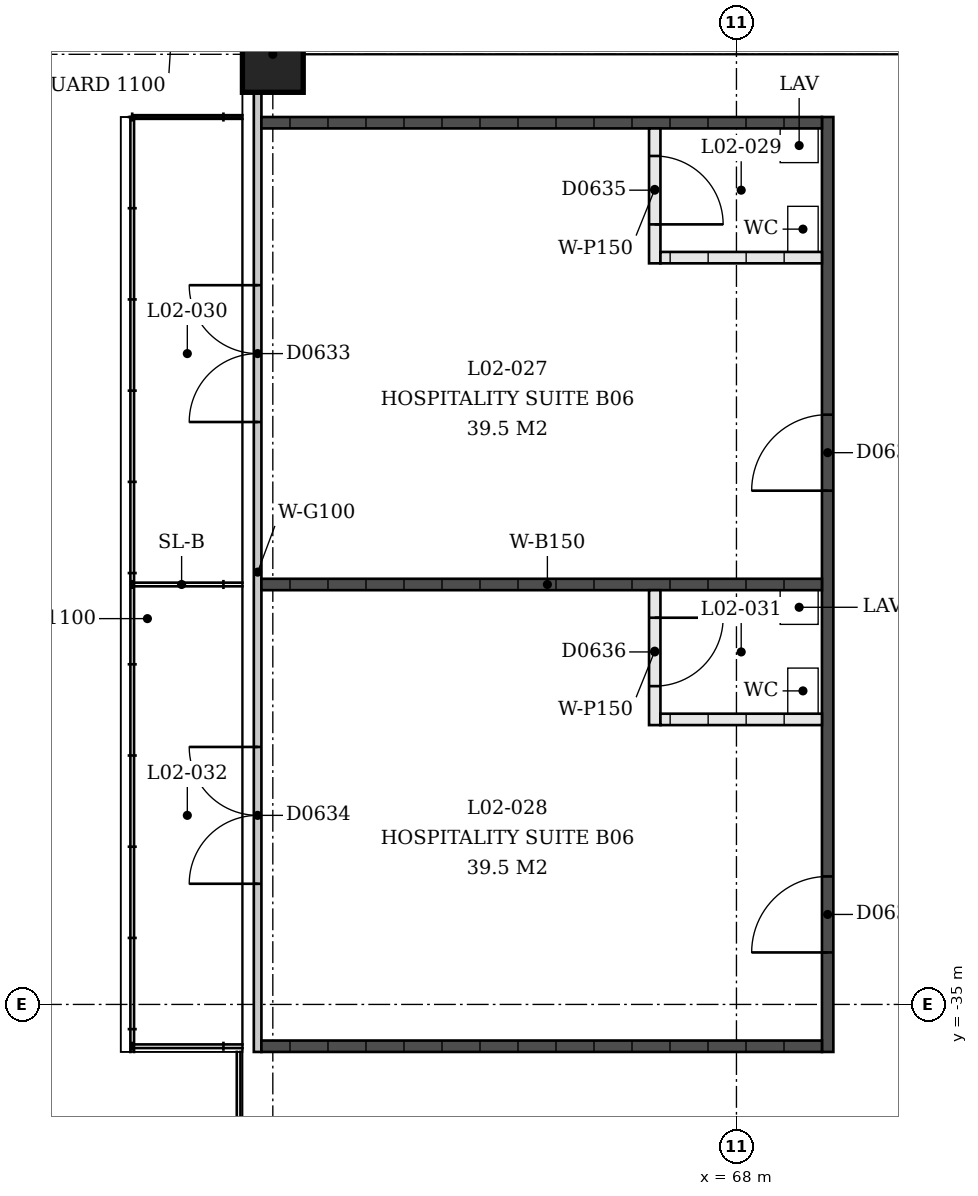
"""IFC4 building model, lengths in metres.
Left out: names, types, materials, properties, quantities, classifications, styles, units other than length and angle.
Written with IfcOpenShell. Run it as: python <this file> out.ifc"""

import sys

from ifc_helpers import new_model, si_unit, direction, frame, frame_2d, origin, origin_2d, place, context, subcontext, project, spatial, rectangle, extrude, element, fill, save


model = new_model("IFC4")
c1 = context("Model", 3, precision=1e-05, world=origin(), true_north=direction((0.0, 1.0)))
c2 = subcontext(c1, "Body", "Model", "MODEL_VIEW")
j1 = project(units=[si_unit("LENGTHUNIT", "METRE"), si_unit("PLANEANGLEUNIT", "RADIAN")], contexts=[c1])
p1 = place(None, origin())
s1 = spatial("IfcSite", under=j1, at=p1, CompositionType="ELEMENT")
p2 = place(p1, origin())
s2 = spatial("IfcBuilding", under=s1, at=p2, CompositionType="ELEMENT")
p3 = place(p2, frame((0.0, 0.0, 9.0)))
s3 = spatial("IfcBuildingStorey", under=s2, at=p3, CompositionType="ELEMENT", Elevation=9.0)
p4 = place(p3, frame((61.9, -22.5, 0.0), z_axis=(0.0, 0.0, 1.0), x_axis=(0.0, 1.0, 0.0)))
e1 = element("IfcColumn", 1, at=p4, inside=s3, PredefinedType="COLUMN", context=c2, shape_type="SweptSolid", body=[
    extrude(rectangle(XDim=1.0, YDim=0.8, at=origin_2d()), origin(), (0.0, 0.0, 1.0), 4.5),
])
p5 = place(p3, frame((61.7, -23.0, 0.0), z_axis=(0.0, 0.0, 1.0), x_axis=(0.0, -1.0, 0.0)))
e2 = element("IfcWall", 2, at=p5, inside=s3, PredefinedType="PARTITIONING", context=c2, shape_type="SweptSolid", body=[
    extrude(rectangle(XDim=12.625, YDim=0.1, at=frame_2d((6.312, 0.0))), origin(), (0.0, 0.0, 1.0), 3.0),
])
p6 = place(p5, frame((2.538, 0.0, 0.0)))
e3 = element("IfcOpeningElement", 3, at=p6, cuts=e2, PredefinedType="OPENING", context=c2, shape_type="SweptSolid", body=[
    extrude(rectangle(XDim=1.8, YDim=2.1, at=frame_2d((0.9, 1.05))), frame((0.0, 0.05, 0.0), z_axis=(0.0, -1.0, 0.0), x_axis=(1.0, 0.0, 0.0)), (0.0, 0.0, 1.0), 0.1),
])
p7 = place(p5, frame((8.613, 0.0, 0.0)))
e4 = element("IfcOpeningElement", 4, at=p7, cuts=e2, PredefinedType="OPENING", context=c2, shape_type="SweptSolid", body=[
    extrude(rectangle(XDim=1.8, YDim=2.1, at=frame_2d((0.9, 1.05))), frame((0.0, 0.05, 0.0), z_axis=(0.0, -1.0, 0.0), x_axis=(1.0, 0.0, 0.0)), (0.0, 0.0, 1.0), 0.1),
])
p8 = place(p3, frame((69.2, -23.325, 0.0), z_axis=(0.0, 0.0, 1.0), x_axis=(0.0, -1.0, 0.0)))
e5 = element("IfcWall", 5, at=p8, inside=s3, PredefinedType="SOLIDWALL", context=c2, shape_type="SweptSolid", body=[
    extrude(rectangle(XDim=12.3, YDim=0.15, at=frame_2d((6.15, 0.0))), origin(), (0.0, 0.0, 1.0), 3.0),
])
p9 = place(p8, frame((3.916, 0.0, 0.0)))
e6 = element("IfcOpeningElement", 6, at=p9, cuts=e5, PredefinedType="OPENING", context=c2, shape_type="SweptSolid", body=[
    extrude(rectangle(XDim=1.0, YDim=2.1, at=frame_2d((0.5, 1.05))), frame((0.0, 0.075, 0.0), z_axis=(0.0, -1.0, 0.0), x_axis=(1.0, 0.0, 0.0)), (0.0, 0.0, 1.0), 0.15),
])
p10 = place(p8, frame((9.991, 0.0, 0.0)))
e7 = element("IfcOpeningElement", 7, at=p10, cuts=e5, PredefinedType="OPENING", context=c2, shape_type="SweptSolid", body=[
    extrude(rectangle(XDim=1.0, YDim=2.1, at=frame_2d((0.5, 1.05))), frame((0.0, 0.075, 0.0), z_axis=(0.0, -1.0, 0.0), x_axis=(1.0, 0.0, 0.0)), (0.0, 0.0, 1.0), 0.15),
])
for number, where, z_axis, x_axis in (
    (8, (61.75, -23.4, 0.0), (0.0, 0.0, 1.0), (1.0, 0.0, 0.0)),
    (9, (61.75, -29.475, 0.0), (0.0, 0.0, 1.0), (1.0, 0.0, 0.0)),
    (10, (61.75, -35.55, 0.0), (0.0, 0.0, 1.0), (1.0, 0.0, 0.0)),
):
    element("IfcWall", number, at=place(p3, frame(where, z_axis=z_axis, x_axis=x_axis)), inside=s3, PredefinedType="SOLIDWALL", context=c2, shape_type="SweptSolid", body=[
        extrude(rectangle(XDim=7.375, YDim=0.15, at=frame_2d((3.688, 0.0))), origin(), (0.0, 0.0, 1.0), 3.0),
    ])
p11 = place(p3, frame((66.925, -23.475, 0.0), z_axis=(0.0, 0.0, 1.0), x_axis=(0.0, -1.0, 0.0)))
e11 = element("IfcWall", 11, at=p11, inside=s3, PredefinedType="PARTITIONING", context=c2, shape_type="SweptSolid", body=[
    extrude(rectangle(XDim=1.775, YDim=0.15, at=frame_2d((0.887, 0.0))), origin(), (0.0, 0.0, 1.0), 3.0),
])
p12 = place(p11, frame((0.363, 0.0, 0.0)))
e12 = element("IfcOpeningElement", 12, at=p12, cuts=e11, PredefinedType="OPENING", context=c2, shape_type="SweptSolid", body=[
    extrude(rectangle(XDim=0.9, YDim=2.1, at=frame_2d((0.45, 1.05))), frame((0.0, 0.075, 0.0), z_axis=(0.0, -1.0, 0.0), x_axis=(1.0, 0.0, 0.0)), (0.0, 0.0, 1.0), 0.15),
])
p13 = place(p3, frame((67.0, -25.175, 0.0), z_axis=(0.0, 0.0, 1.0), x_axis=(1.0, 0.0, 0.0)))
e13 = element("IfcWall", 13, at=p13, inside=s3, PredefinedType="PARTITIONING", context=c2, shape_type="SweptSolid", body=[
    extrude(rectangle(XDim=2.125, YDim=0.15, at=frame_2d((1.062, 0.0))), origin(), (0.0, 0.0, 1.0), 3.0),
])
p14 = place(p3, frame((66.925, -29.55, 0.0), z_axis=(0.0, 0.0, 1.0), x_axis=(0.0, -1.0, 0.0)))
e14 = element("IfcWall", 14, at=p14, inside=s3, PredefinedType="PARTITIONING", context=c2, shape_type="SweptSolid", body=[
    extrude(rectangle(XDim=1.775, YDim=0.15, at=frame_2d((0.887, 0.0))), origin(), (0.0, 0.0, 1.0), 3.0),
])
p15 = place(p14, frame((0.363, 0.0, 0.0)))
e15 = element("IfcOpeningElement", 15, at=p15, cuts=e14, PredefinedType="OPENING", context=c2, shape_type="SweptSolid", body=[
    extrude(rectangle(XDim=0.9, YDim=2.1, at=frame_2d((0.45, 1.05))), frame((0.0, 0.075, 0.0), z_axis=(0.0, -1.0, 0.0), x_axis=(1.0, 0.0, 0.0)), (0.0, 0.0, 1.0), 0.15),
])
p16 = place(p3, frame((67.0, -31.25, 0.0), z_axis=(0.0, 0.0, 1.0), x_axis=(1.0, 0.0, 0.0)))
e16 = element("IfcWall", 16, at=p16, inside=s3, PredefinedType="PARTITIONING", context=c2, shape_type="SweptSolid", body=[
    extrude(rectangle(XDim=2.125, YDim=0.15, at=frame_2d((1.062, 0.0))), origin(), (0.0, 0.0, 1.0), 3.0),
])
p17 = place(p9, origin())
e17 = element("IfcDoor", 17, at=p17, inside=s3, OperationType="SINGLE_SWING_RIGHT", PredefinedType="DOOR", context=c2, shape_type="SweptSolid", body=[
    extrude(rectangle(XDim=1.0, YDim=2.1, at=frame_2d((0.5, 1.05))), frame((0.0, 0.025, 0.0), z_axis=(0.0, -1.0, 0.0), x_axis=(1.0, 0.0, 0.0)), (0.0, 0.0, 1.0), 0.05),
])
fill(e6, e17)
p18 = place(p10, origin())
e18 = element("IfcDoor", 18, at=p18, inside=s3, OperationType="SINGLE_SWING_RIGHT", PredefinedType="DOOR", context=c2, shape_type="SweptSolid", body=[
    extrude(rectangle(XDim=1.0, YDim=2.1, at=frame_2d((0.5, 1.05))), frame((0.0, 0.025, 0.0), z_axis=(0.0, -1.0, 0.0), x_axis=(1.0, 0.0, 0.0)), (0.0, 0.0, 1.0), 0.05),
])
fill(e7, e18)
p19 = place(p6, origin())
e19 = element("IfcDoor", 19, at=p19, inside=s3, OperationType="DOUBLE_DOOR_SINGLE_SWING", PredefinedType="DOOR", context=c2, shape_type="SweptSolid", body=[
    extrude(rectangle(XDim=1.8, YDim=2.1, at=frame_2d((0.9, 1.05))), frame((0.0, 0.025, 0.0), z_axis=(0.0, -1.0, 0.0), x_axis=(1.0, 0.0, 0.0)), (0.0, 0.0, 1.0), 0.05),
])
fill(e3, e19)
p20 = place(p7, origin())
e20 = element("IfcDoor", 20, at=p20, inside=s3, OperationType="DOUBLE_DOOR_SINGLE_SWING", PredefinedType="DOOR", context=c2, shape_type="SweptSolid", body=[
    extrude(rectangle(XDim=1.8, YDim=2.1, at=frame_2d((0.9, 1.05))), frame((0.0, 0.025, 0.0), z_axis=(0.0, -1.0, 0.0), x_axis=(1.0, 0.0, 0.0)), (0.0, 0.0, 1.0), 0.05),
])
fill(e4, e20)
p21 = place(p12, origin())
e21 = element("IfcDoor", 21, at=p21, inside=s3, OperationType="SINGLE_SWING_LEFT", PredefinedType="DOOR", context=c2, shape_type="SweptSolid", body=[
    extrude(rectangle(XDim=0.9, YDim=2.1, at=frame_2d((0.45, 1.05))), frame((0.0, 0.025, 0.0), z_axis=(0.0, -1.0, 0.0), x_axis=(1.0, 0.0, 0.0)), (0.0, 0.0, 1.0), 0.05),
])
fill(e12, e21)
p22 = place(p15, origin())
e22 = element("IfcDoor", 22, at=p22, inside=s3, OperationType="SINGLE_SWING_RIGHT", PredefinedType="DOOR", context=c2, shape_type="SweptSolid", body=[
    extrude(rectangle(XDim=0.9, YDim=2.1, at=frame_2d((0.45, 1.05))), frame((0.0, 0.025, 0.0), z_axis=(0.0, -1.0, 0.0), x_axis=(1.0, 0.0, 0.0)), (0.0, 0.0, 1.0), 0.05),
])
fill(e15, e22)
save(model, sys.argv[1])
